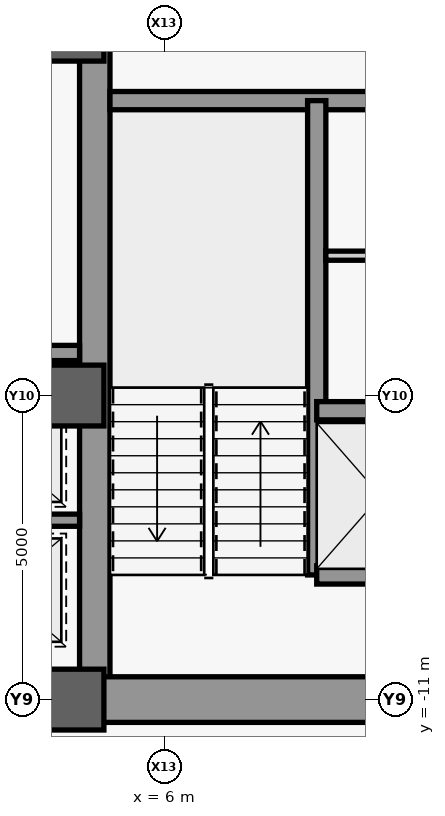
"""IFC4 building model, lengths in metres.
Left out: names, types, materials, properties, quantities, classifications, styles, units other than length and angle.
Written with IfcOpenShell. Run it as: python <this file> out.ifc"""

import sys

from ifc_helpers import new_model, si_unit, direction, frame, frame_2d, origin, origin_2d, place, context, subcontext, project, spatial, rectangle, extrude, source, transform, mapped, element, save


model = new_model("IFC4")
c1 = context("Model", 3, precision=1e-05, world=origin(), true_north=direction((0.0, 1.0)))
c2 = subcontext(c1, "Body", "Model", "MODEL_VIEW")
j1 = project(units=[si_unit("LENGTHUNIT", "METRE"), si_unit("PLANEANGLEUNIT", "RADIAN")], contexts=[c1])
p1 = place(None, origin())
s1 = spatial("IfcSite", under=j1, at=p1, CompositionType="ELEMENT")
p2 = place(p1, origin())
s2 = spatial("IfcBuilding", under=s1, at=p2, CompositionType="ELEMENT")
p3 = place(p2, frame((0.0, 0.0, 128.3)))
s3 = spatial("IfcBuildingStorey", under=s2, at=p3, CompositionType="ELEMENT", Elevation=128.3)
m1 = source(origin(), c2, "Body", "SweptSolid", [
    extrude(rectangle(XDim=21.4, YDim=0.5, at=frame_2d((10.7, 0.0))), origin(), (0.0, 0.0, 1.0), 3.84),
])
p4 = place(p3, frame((4.85, -10.7, 0.0), z_axis=(0.0, 0.0, 1.0), x_axis=(0.0, 1.0, 0.0)))
e1 = element("IfcWall", 1, at=p4, inside=s3, PredefinedType="SHEAR", context=c2, shape_type="MappedRepresentation", body=[
    mapped(m1, transform((0.0, 0.0, 0.0), scale=1.0)),
])
m2 = source(origin(), c2, "Body", "SweptSolid", [
    extrude(rectangle(XDim=5.85, YDim=0.75, at=frame_2d((2.925, 0.0))), origin(), (0.0, 0.0, 1.0), 3.84),
])
p5 = place(p3, frame((4.85, -11.0, 0.0), z_axis=(0.0, 0.0, 1.0), x_axis=(1.0, 0.0, 0.0)))
e2 = element("IfcWall", 2, at=p5, inside=s3, PredefinedType="SHEAR", context=c2, shape_type="MappedRepresentation", body=[
    mapped(m2, transform((0.0, 0.0, 0.0), scale=1.0)),
])
m3 = source(origin(), c2, "Body", "SweptSolid", [
    extrude(rectangle(XDim=5.6, YDim=0.3, at=frame_2d((2.8, 0.0))), origin(), (0.0, 0.0, 1.0), 3.84),
])
p6 = place(p3, frame((5.1, -1.15, 0.0), z_axis=(0.0, 0.0, 1.0), x_axis=(1.0, 0.0, 0.0)))
e3 = element("IfcWall", 3, at=p6, inside=s3, PredefinedType="SHEAR", context=c2, shape_type="MappedRepresentation", body=[
    mapped(m3, transform((0.0, 0.0, 0.0), scale=1.0)),
])
m4 = source(origin(), c2, "Body", "SweptSolid", [
    extrude(rectangle(XDim=9.2, YDim=0.5, at=frame_2d((4.6, 0.0))), origin(), (0.0, 0.0, 1.0), 3.84),
])
p7 = place(p3, frame((-4.6, -11.0, 0.0), z_axis=(0.0, 0.0, 1.0), x_axis=(1.0, 0.0, 0.0)))
e4 = element("IfcWall", 4, at=p7, inside=s3, PredefinedType="SHEAR", context=c2, shape_type="MappedRepresentation", body=[
    mapped(m4, transform((0.0, 0.0, 0.0), scale=1.0)),
])
m5 = source(origin(), c2, "Body", "SweptSolid", [
    extrude(rectangle(XDim=1.8, YDim=2.25, at=frame_2d((0.9, 1.125))), frame((0.0, 0.26, 0.0), z_axis=(0.0, -1.0, 0.0), x_axis=(1.0, 0.0, 0.0)), (0.0, 0.0, 1.0), 0.52),
])
p8 = place(p7, frame((3.7, 0.0, 0.0)))
e5 = element("IfcOpeningElement", 5, at=p8, cuts=e4, PredefinedType="OPENING", context=c2, shape_type="MappedRepresentation", body=[
    mapped(m5, transform((0.0, 0.0, 0.0), scale=1.0)),
])
m6 = source(origin(), c2, "Body", "SweptSolid", [
    extrude(rectangle(XDim=1.0, YDim=1.0, at=origin_2d()), origin(), (0.0, 0.0, 1.0), 4.1),
])
for number, where, z_axis, x_axis in (
    (6, (4.5, -11.0, 0.0), (0.0, 0.0, 1.0), (1.0, 0.0, 0.0)),
    (7, (4.5, -6.0, 0.0), (0.0, 0.0, 1.0), (1.0, 0.0, 0.0)),
    (8, (4.5, 0.0, 0.0), (0.0, 0.0, 1.0), (1.0, 0.0, 0.0)),
):
    element("IfcColumn", number, at=place(p3, frame(where, z_axis=z_axis, x_axis=x_axis)), inside=s3, PredefinedType="COLUMN", context=c2, shape_type="MappedRepresentation", body=[
        mapped(m6, transform((0.0, 0.0, 0.0), scale=1.0)),
    ])
m7 = source(origin(), c2, "Body", "SweptSolid", [
    extrude(rectangle(XDim=7.8, YDim=0.3, at=frame_2d((3.9, 0.0))), origin(), (0.0, 0.0, 1.0), 3.84),
])
p9 = place(p3, frame((8.5, -8.95, 0.0), z_axis=(0.0, 0.0, 1.0), x_axis=(0.0, 1.0, 0.0)))
e9 = element("IfcWall", 9, at=p9, inside=s3, PredefinedType="SHEAR", context=c2, shape_type="MappedRepresentation", body=[
    mapped(m7, transform((0.0, 0.0, 0.0), scale=1.0)),
])
m8 = source(origin(), c2, "Body", "SweptSolid", [
    extrude(rectangle(XDim=2.2, YDim=0.3, at=frame_2d((1.1, 0.0))), origin(), (0.0, 0.0, 1.0), 3.84),
])
for number, where, z_axis, x_axis in (
    (10, (8.5, -8.95, 0.0), (0.0, 0.0, 1.0), (1.0, 0.0, 0.0)),
    (11, (8.5, -6.25, 0.0), (0.0, 0.0, 1.0), (1.0, 0.0, 0.0)),
):
    element("IfcWall", number, at=place(p3, frame(where, z_axis=z_axis, x_axis=x_axis)), inside=s3, PredefinedType="SHEAR", context=c2, shape_type="MappedRepresentation", body=[
        mapped(m8, transform((0.0, 0.0, 0.0), scale=1.0)),
    ])
m9 = source(origin(), c2, "Body", "SweptSolid", [
    extrude(rectangle(XDim=2.05, YDim=0.15, at=frame_2d((1.025, 0.0))), origin(), (0.0, 0.0, 1.0), 3.84),
])
p10 = place(p3, frame((8.65, -3.7, 0.0), z_axis=(0.0, 0.0, 1.0), x_axis=(1.0, 0.0, 0.0)))
e12 = element("IfcWall", 12, at=p10, inside=s3, PredefinedType="PARTITIONING", context=c2, shape_type="MappedRepresentation", body=[
    mapped(m9, transform((0.0, 0.0, 0.0), scale=1.0)),
])
m10 = source(origin(), c2, "Body", "SweptSolid", [
    extrude(rectangle(XDim=2.45, YDim=0.2, at=frame_2d((1.225, 0.0))), origin(), (0.0, 0.0, 1.0), 3.84),
])
p11 = place(p3, frame((2.15, -8.05, 0.0), z_axis=(0.0, 0.0, 1.0), x_axis=(1.0, 0.0, 0.0)))
e13 = element("IfcWall", 13, at=p11, inside=s3, PredefinedType="SHEAR", context=c2, shape_type="MappedRepresentation", body=[
    mapped(m10, transform((0.0, 0.0, 0.0), scale=1.0)),
])
m11 = source(origin(), c2, "Body", "SweptSolid", [
    extrude(rectangle(XDim=9.2, YDim=0.25, at=frame_2d((4.6, 0.0))), origin(), (0.0, 0.0, 1.0), 3.84),
])
p12 = place(p3, frame((-4.6, -5.3, 0.0), z_axis=(0.0, 0.0, 1.0), x_axis=(1.0, 0.0, 0.0)))
e14 = element("IfcWall", 14, at=p12, inside=s3, PredefinedType="SHEAR", context=c2, shape_type="MappedRepresentation", body=[
    mapped(m11, transform((0.0, 0.0, 0.0), scale=1.0)),
])
m12 = source(origin(), c2, "Body", "SweptSolid", [
    extrude(rectangle(XDim=1.05, YDim=2.2, at=frame_2d((0.525, 1.1))), frame((0.0, 0.135, 0.0), z_axis=(0.0, -1.0, 0.0), x_axis=(1.0, 0.0, 0.0)), (0.0, 0.0, 1.0), 0.27),
])
p13 = place(p12, frame((4.075, 0.0, 0.0)))
e15 = element("IfcOpeningElement", 15, at=p13, cuts=e14, PredefinedType="OPENING", context=c2, shape_type="MappedRepresentation", body=[
    mapped(m12, transform((0.0, 0.0, 0.0), scale=1.0)),
])
save(model, sys.argv[1])
